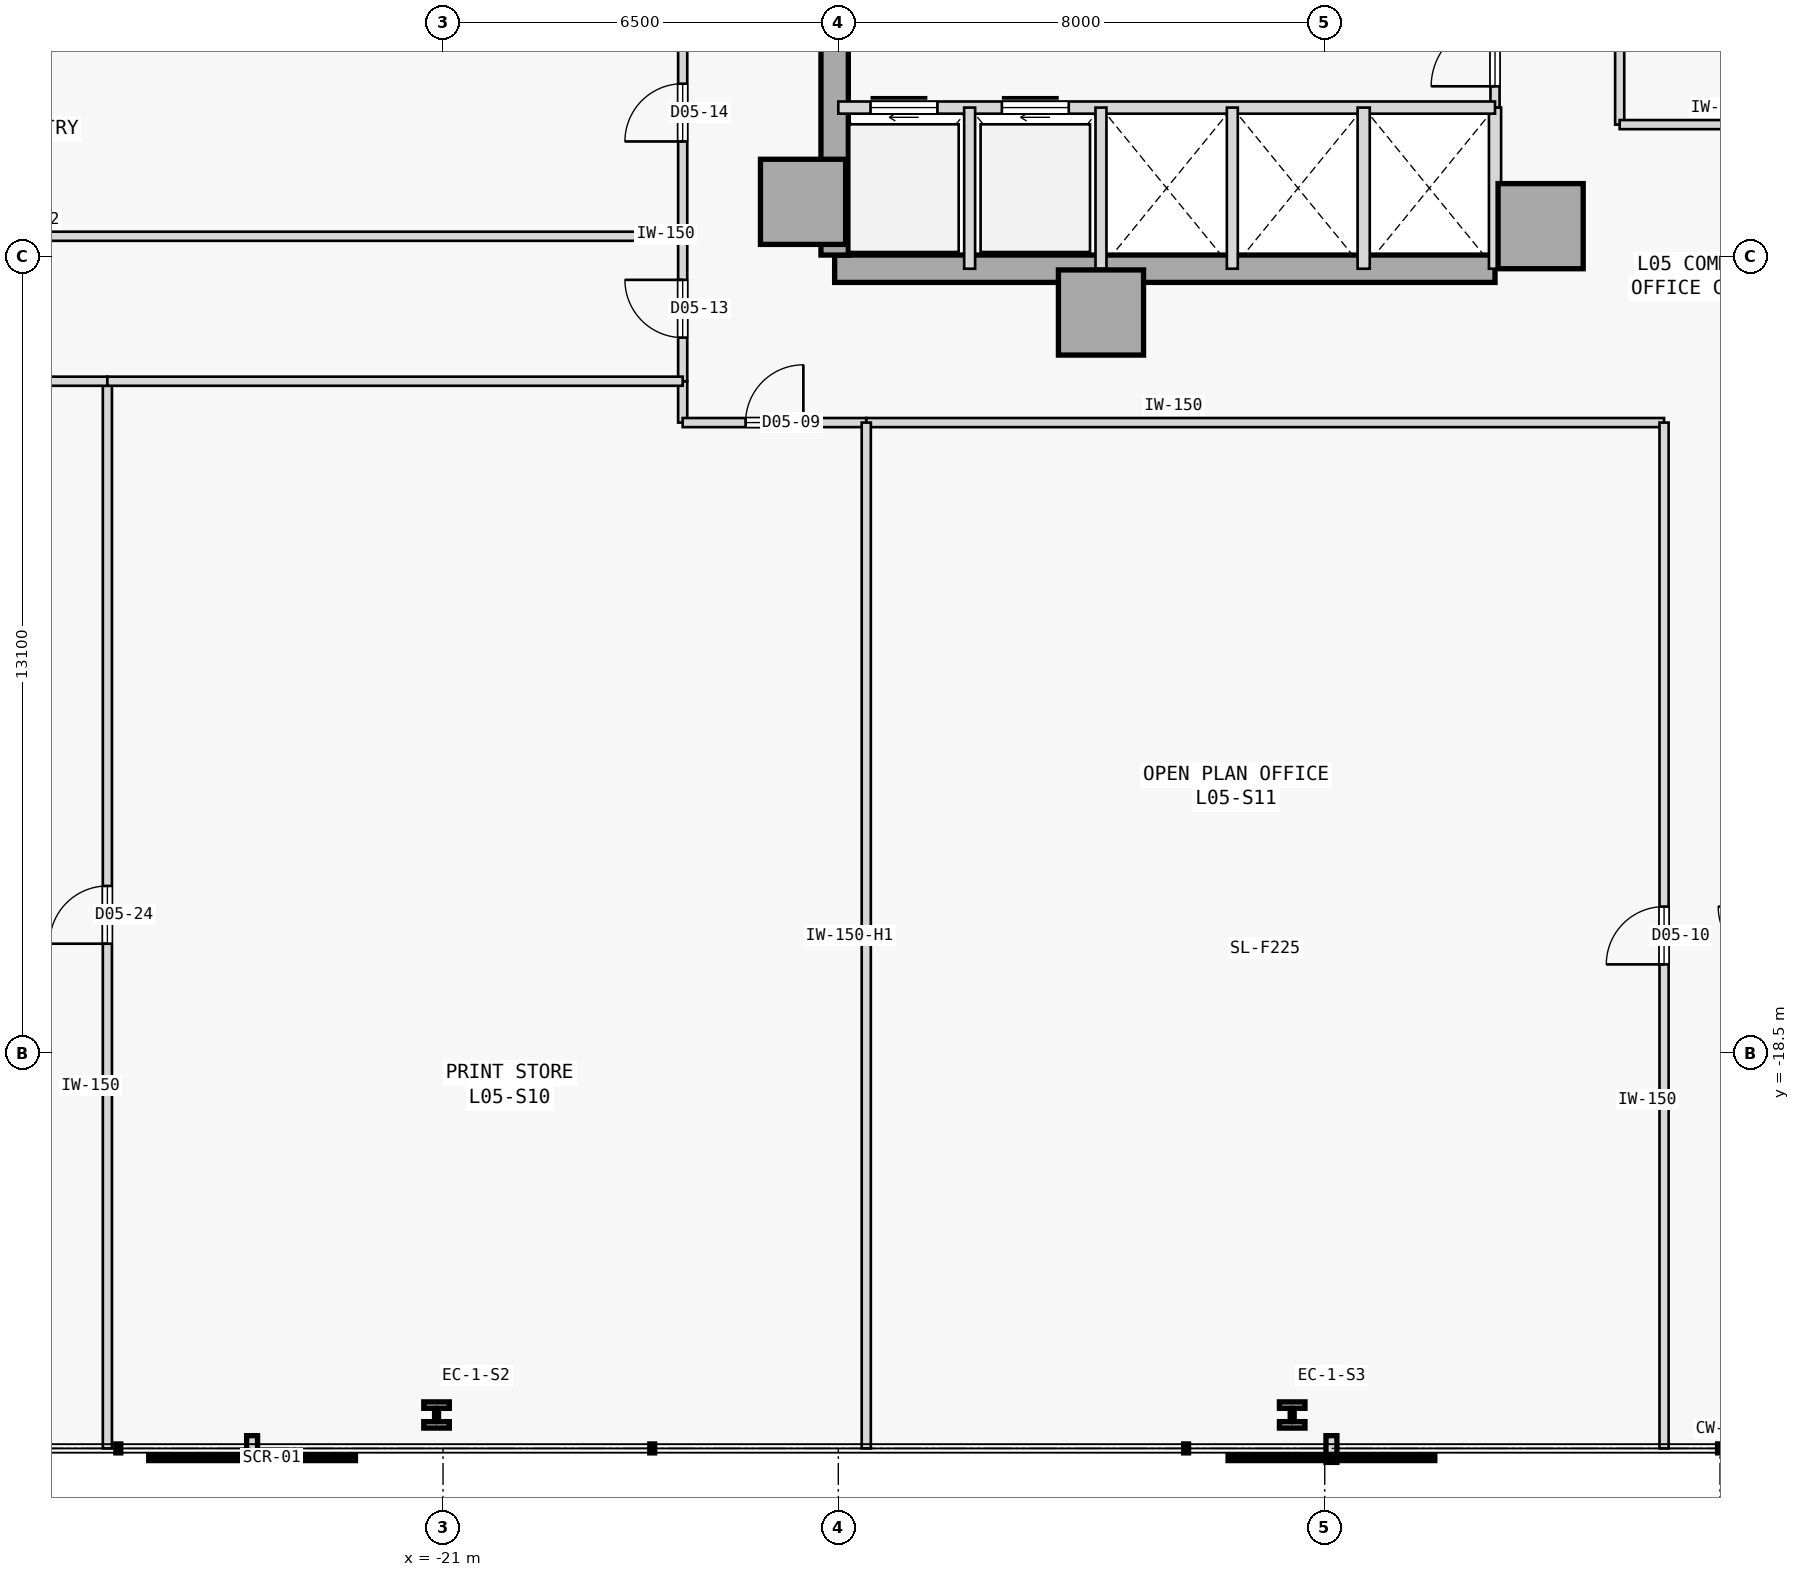
"""IFC4 building model, lengths in metres.
Left out: names, types, materials, properties, quantities, classifications, styles, units other than length and angle.
Written with IfcOpenShell. Run it as: python <this file> out.ifc"""

import sys

from ifc_helpers import new_model, si_unit, direction, frame, frame_2d, origin, origin_2d, place, context, subcontext, project, spatial, rectangle, i_section, extrude, element, fill, save


model = new_model("IFC4")
c1 = context("Model", 3, precision=1e-05, world=origin(), true_north=direction((0.0, 1.0)))
c2 = subcontext(c1, "Body", "Model", "MODEL_VIEW")
j1 = project(units=[si_unit("LENGTHUNIT", "METRE"), si_unit("PLANEANGLEUNIT", "RADIAN")], contexts=[c1])
p1 = place(None, origin())
s1 = spatial("IfcSite", under=j1, at=p1, CompositionType="ELEMENT")
p2 = place(p1, origin())
s2 = spatial("IfcBuilding", under=s1, at=p2, CompositionType="ELEMENT")
p3 = place(p2, frame((0.0, 0.0, 25.6)))
s3 = spatial("IfcBuildingStorey", under=s2, at=p3, CompositionType="ELEMENT", Elevation=25.6)
for number, where, z_axis, x_axis in (
    (1, (-15.08, -4.5, 0.0), (0.0, 0.0, 1.0), (1.0, 0.0, 0.0)),
    (2, (-10.18, -6.32, 0.0), (0.0, 0.0, 1.0), (1.0, 0.0, 0.0)),
    (3, (-2.95, -4.9, 0.0), (0.0, 0.0, 1.0), (1.0, 0.0, 0.0)),
):
    element("IfcColumn", number, at=place(p3, frame(where, z_axis=z_axis, x_axis=x_axis)), inside=s3, PredefinedType="COLUMN", context=c2, shape_type="SweptSolid", body=[
        extrude(rectangle(XDim=1.4, YDim=1.4, at=origin_2d()), origin(), (0.0, 0.0, 1.0), 3.8),
    ])
p4 = place(p3, frame((-14.56, -5.6, 0.0), z_axis=(0.0, 0.0, 1.0), x_axis=(1.0, 0.0, 0.0)))
e4 = element("IfcWall", 4, at=p4, inside=s3, PredefinedType="SHEAR", context=c2, shape_type="SweptSolid", body=[
    extrude(rectangle(XDim=10.86, YDim=0.45, at=frame_2d((5.43, 0.0))), origin(), (0.0, 0.0, 1.0), 3.575),
])
p5 = place(p3, frame((-14.56, -5.375, 0.0), z_axis=(0.0, 0.0, 1.0), x_axis=(0.0, 1.0, 0.0)))
e5 = element("IfcWall", 5, at=p5, inside=s3, PredefinedType="SHEAR", context=c2, shape_type="SweptSolid", body=[
    extrude(rectangle(XDim=10.75, YDim=0.45, at=frame_2d((5.375, 0.0))), origin(), (0.0, 0.0, 1.0), 3.575),
])
for number, where, z_axis, x_axis in (
    (6, (-21.107, -24.45, 0.0), (0.0, 0.0, 1.0), (1.0, 0.0, 0.0)),
    (7, (-7.036, -24.45, 0.0), (0.0, 0.0, 1.0), (1.0, 0.0, 0.0)),
):
    element("IfcColumn", number, at=place(p3, frame(where, z_axis=z_axis, x_axis=x_axis)), inside=s3, PredefinedType="COLUMN", context=c2, shape_type="SweptSolid", body=[
        extrude(i_section(OverallWidth=0.42, OverallDepth=0.431, WebThickness=0.065, FlangeThickness=0.106, FilletRadius=0.015, at=origin_2d()), origin(), (0.0, 0.0, 1.0), 3.8),
    ])
p6 = place(p3, frame((-3.7, -2.95, 0.0), z_axis=(0.0, 0.0, 1.0), x_axis=(0.0, 1.0, 0.0)))
e8 = element("IfcWall", 8, at=p6, inside=s3, PredefinedType="PARTITIONING", context=c2, shape_type="SweptSolid", body=[
    extrude(rectangle(XDim=1.8, YDim=0.15, at=frame_2d((0.9, 0.0))), origin(), (0.0, 0.0, 1.0), 3.575),
])
p7 = place(p6, frame((0.35, 0.0, 0.0)))
e9 = element("IfcOpeningElement", 9, at=p7, cuts=e8, PredefinedType="OPENING", context=c2, shape_type="SweptSolid", body=[
    extrude(rectangle(XDim=1.05, YDim=2.18, at=frame_2d((0.525, 1.09))), frame((0.0, 0.085, 0.0), z_axis=(0.0, -1.0, 0.0), x_axis=(1.0, 0.0, 0.0)), (0.0, 0.0, 1.0), 0.17),
])
p8 = place(p3, frame((-3.7, -5.6, 0.0), z_axis=(0.0, 0.0, 1.0), x_axis=(0.0, 1.0, 0.0)))
e10 = element("IfcWall", 10, at=p8, inside=s3, PredefinedType="STANDARD", context=c2, shape_type="SweptSolid", body=[
    extrude(rectangle(XDim=2.65, YDim=0.2, at=frame_2d((1.325, 0.0))), origin(), (0.0, 0.0, 1.0), 3.575),
])
p9 = place(p3, frame((-14.5, -2.95, 0.0), z_axis=(0.0, 0.0, 1.0), x_axis=(1.0, 0.0, 0.0)))
e11 = element("IfcWall", 11, at=p9, inside=s3, PredefinedType="STANDARD", context=c2, shape_type="SweptSolid", body=[
    extrude(rectangle(XDim=10.8, YDim=0.2, at=frame_2d((5.4, 0.0))), origin(), (0.0, 0.0, 1.0), 3.575),
])
p10 = place(p9, frame((0.53, 0.0, 0.0)))
e12 = element("IfcOpeningElement", 12, at=p10, cuts=e11, PredefinedType="OPENING", context=c2, shape_type="SweptSolid", body=[
    extrude(rectangle(XDim=1.1, YDim=2.15, at=frame_2d((0.55, 1.075))), frame((0.0, 0.11, 0.0), z_axis=(0.0, -1.0, 0.0), x_axis=(1.0, 0.0, 0.0)), (0.0, 0.0, 1.0), 0.22),
])
p11 = place(p9, frame((2.69, 0.0, 0.0)))
e13 = element("IfcOpeningElement", 13, at=p11, cuts=e11, PredefinedType="OPENING", context=c2, shape_type="SweptSolid", body=[
    extrude(rectangle(XDim=1.1, YDim=2.15, at=frame_2d((0.55, 1.075))), frame((0.0, 0.11, 0.0), z_axis=(0.0, -1.0, 0.0), x_axis=(1.0, 0.0, 0.0)), (0.0, 0.0, 1.0), 0.22),
])
p12 = place(p3, frame((-5.86, -5.6, 0.0), z_axis=(0.0, 0.0, 1.0), x_axis=(0.0, 1.0, 0.0)))
e14 = element("IfcWall", 14, at=p12, inside=s3, PredefinedType="STANDARD", context=c2, shape_type="SweptSolid", body=[
    extrude(rectangle(XDim=2.65, YDim=0.2, at=frame_2d((1.325, 0.0))), origin(), (0.0, 0.0, 1.0), 3.575),
])
for number, where, z_axis, x_axis in (
    (15, (-12.34, -5.6, 0.0), (0.0, 0.0, 1.0), (0.0, 1.0, 0.0)),
    (16, (-10.18, -5.6, 0.0), (0.0, 0.0, 1.0), (0.0, 1.0, 0.0)),
    (17, (-8.02, -5.6, 0.0), (0.0, 0.0, 1.0), (0.0, 1.0, 0.0)),
):
    element("IfcWall", number, at=place(p3, frame(where, z_axis=z_axis, x_axis=x_axis)), inside=s3, PredefinedType="STANDARD", context=c2, shape_type="SweptSolid", body=[
        extrude(rectangle(XDim=2.65, YDim=0.18, at=frame_2d((1.325, 0.0))), origin(), (0.0, 0.0, 1.0), 3.575),
    ])
p13 = place(p3, frame((-1.65, -3.23, 0.0), z_axis=(0.0, 0.0, 1.0), x_axis=(0.0, 1.0, 0.0)))
e18 = element("IfcWall", 18, at=p13, inside=s3, PredefinedType="PARTITIONING", context=c2, shape_type="SweptSolid", body=[
    extrude(rectangle(XDim=6.46, YDim=0.15, at=frame_2d((3.23, 0.0))), origin(), (0.0, 0.0, 1.0), 3.575),
])
p14 = place(p13, frame((2.755, 0.0, 0.0)))
e19 = element("IfcOpeningElement", 19, at=p14, cuts=e18, PredefinedType="OPENING", context=c2, shape_type="SweptSolid", body=[
    extrude(rectangle(XDim=0.95, YDim=2.15, at=frame_2d((0.475, 1.075))), frame((0.0, 0.085, 0.0), z_axis=(0.0, -1.0, 0.0), x_axis=(1.0, 0.0, 0.0)), (0.0, 0.0, 1.0), 0.17),
])
p15 = place(p3, frame((-1.65, -3.23, 0.0), z_axis=(0.0, 0.0, 1.0), x_axis=(1.0, 0.0, 0.0)))
e20 = element("IfcWall", 20, at=p15, inside=s3, PredefinedType="PARTITIONING", context=c2, shape_type="SweptSolid", body=[
    extrude(rectangle(XDim=3.3, YDim=0.15, at=frame_2d((1.65, 0.0))), origin(), (0.0, 0.0, 1.0), 3.575),
])
p16 = place(p3, frame((-17.059, -8.13, 0.0), z_axis=(0.0, 0.0, 1.0), x_axis=(0.0, 1.0, 0.0)))
e21 = element("IfcWall", 21, at=p16, inside=s3, PredefinedType="PARTITIONING", context=c2, shape_type="SweptSolid", body=[
    extrude(rectangle(XDim=0.68, YDim=0.15, at=frame_2d((0.34, 0.0))), origin(), (0.0, 0.0, 1.0), 3.575),
])
p17 = place(p3, frame((-17.059, -8.13, 0.0), z_axis=(0.0, 0.0, 1.0), x_axis=(1.0, 0.0, 0.0)))
e22 = element("IfcWall", 22, at=p17, inside=s3, PredefinedType="PARTITIONING", context=c2, shape_type="SweptSolid", body=[
    extrude(rectangle(XDim=3.019, YDim=0.15, at=frame_2d((1.51, 0.0))), origin(), (0.0, 0.0, 1.0), 3.575),
])
p18 = place(p17, frame((1.034, 0.0, 0.0)))
e23 = element("IfcOpeningElement", 23, at=p18, cuts=e22, PredefinedType="OPENING", context=c2, shape_type="SweptSolid", body=[
    extrude(rectangle(XDim=0.95, YDim=2.15, at=frame_2d((0.475, 1.075))), frame((0.0, 0.085, 0.0), z_axis=(0.0, -1.0, 0.0), x_axis=(1.0, 0.0, 0.0)), (0.0, 0.0, 1.0), 0.17),
])
p19 = place(p3, frame((-14.04, -8.13, 0.0), z_axis=(0.0, 0.0, 1.0), x_axis=(1.0, 0.0, 0.0)))
e24 = element("IfcWall", 24, at=p19, inside=s3, PredefinedType="PARTITIONING", context=c2, shape_type="SweptSolid", body=[
    extrude(rectangle(XDim=13.12, YDim=0.15, at=frame_2d((6.56, 0.0))), origin(), (0.0, 0.0, 1.0), 3.575),
])
p20 = place(p3, frame((-0.92, -25.0, 0.0), z_axis=(0.0, 0.0, 1.0), x_axis=(0.0, 1.0, 0.0)))
e25 = element("IfcWall", 25, at=p20, inside=s3, PredefinedType="PARTITIONING", context=c2, shape_type="SweptSolid", body=[
    extrude(rectangle(XDim=16.87, YDim=0.15, at=frame_2d((8.435, 0.0))), origin(), (0.0, 0.0, 1.0), 3.575),
])
p21 = place(p20, frame((7.96, 0.0, 0.0)))
e26 = element("IfcOpeningElement", 26, at=p21, cuts=e25, PredefinedType="OPENING", context=c2, shape_type="SweptSolid", body=[
    extrude(rectangle(XDim=0.95, YDim=2.15, at=frame_2d((0.475, 1.075))), frame((0.0, 0.085, 0.0), z_axis=(0.0, -1.0, 0.0), x_axis=(1.0, 0.0, 0.0)), (0.0, 0.0, 1.0), 0.17),
])
p22 = place(p3, frame((-17.059, -7.45, 0.0), z_axis=(0.0, 0.0, 1.0), x_axis=(0.0, 1.0, 0.0)))
e27 = element("IfcWall", 27, at=p22, inside=s3, PredefinedType="PARTITIONING", context=c2, shape_type="SweptSolid", body=[
    extrude(rectangle(XDim=2.384, YDim=0.15, at=frame_2d((1.192, 0.0))), origin(), (0.0, 0.0, 1.0), 3.575),
])
p23 = place(p22, frame((0.717, 0.0, 0.0)))
e28 = element("IfcOpeningElement", 28, at=p23, cuts=e27, PredefinedType="OPENING", context=c2, shape_type="SweptSolid", body=[
    extrude(rectangle(XDim=0.95, YDim=2.15, at=frame_2d((0.475, 1.075))), frame((0.0, 0.085, 0.0), z_axis=(0.0, -1.0, 0.0), x_axis=(1.0, 0.0, 0.0)), (0.0, 0.0, 1.0), 0.17),
])
p24 = place(p3, frame((-17.059, -5.066, 0.0), z_axis=(0.0, 0.0, 1.0), x_axis=(0.0, 1.0, 0.0)))
e29 = element("IfcWall", 29, at=p24, inside=s3, PredefinedType="PARTITIONING", context=c2, shape_type="SweptSolid", body=[
    extrude(rectangle(XDim=3.129, YDim=0.15, at=frame_2d((1.564, 0.0))), origin(), (0.0, 0.0, 1.0), 3.575),
])
p25 = place(p24, frame((1.559, 0.0, 0.0)))
e30 = element("IfcOpeningElement", 30, at=p25, cuts=e29, PredefinedType="OPENING", context=c2, shape_type="SweptSolid", body=[
    extrude(rectangle(XDim=0.95, YDim=2.15, at=frame_2d((0.475, 1.075))), frame((0.0, 0.085, 0.0), z_axis=(0.0, -1.0, 0.0), x_axis=(1.0, 0.0, 0.0)), (0.0, 0.0, 1.0), 0.17),
])
p26 = place(p3, frame((-26.52, -25.0, 0.0), z_axis=(0.0, 0.0, 1.0), x_axis=(0.0, 1.0, 0.0)))
e31 = element("IfcWall", 31, at=p26, inside=s3, PredefinedType="PARTITIONING", context=c2, shape_type="SweptSolid", body=[
    extrude(rectangle(XDim=17.55, YDim=0.15, at=frame_2d((8.775, 0.0))), origin(), (0.0, 0.0, 1.0), 3.575),
])
p27 = place(p26, frame((8.3, 0.0, 0.0)))
e32 = element("IfcOpeningElement", 32, at=p27, cuts=e31, PredefinedType="OPENING", context=c2, shape_type="SweptSolid", body=[
    extrude(rectangle(XDim=0.95, YDim=2.15, at=frame_2d((0.475, 1.075))), frame((0.0, 0.085, 0.0), z_axis=(0.0, -1.0, 0.0), x_axis=(1.0, 0.0, 0.0)), (0.0, 0.0, 1.0), 0.17),
])
p28 = place(p3, frame((-39.0, -7.45, 0.0), z_axis=(0.0, 0.0, 1.0), x_axis=(1.0, 0.0, 0.0)))
e33 = element("IfcWall", 33, at=p28, inside=s3, PredefinedType="PARTITIONING", context=c2, shape_type="SweptSolid", body=[
    extrude(rectangle(XDim=12.48, YDim=0.15, at=frame_2d((6.24, 0.0))), origin(), (0.0, 0.0, 1.0), 3.575),
])
p29 = place(p3, frame((-14.04, -25.0, 0.0), z_axis=(0.0, 0.0, 1.0), x_axis=(0.0, 1.0, 0.0)))
e34 = element("IfcWall", 34, at=p29, inside=s3, PredefinedType="PARTITIONING", context=c2, shape_type="SweptSolid", body=[
    extrude(rectangle(XDim=16.87, YDim=0.15, at=frame_2d((8.435, 0.0))), origin(), (0.0, 0.0, 1.0), 3.125),
])
p30 = place(p3, frame((-26.52, -7.45, 0.0), z_axis=(0.0, 0.0, 1.0), x_axis=(1.0, 0.0, 0.0)))
e35 = element("IfcWall", 35, at=p30, inside=s3, PredefinedType="PARTITIONING", context=c2, shape_type="SweptSolid", body=[
    extrude(rectangle(XDim=9.461, YDim=0.15, at=frame_2d((4.73, 0.0))), origin(), (0.0, 0.0, 1.0), 3.575),
])
p31 = place(p3, frame((-39.0, -5.066, 0.0), z_axis=(0.0, 0.0, 1.0), x_axis=(1.0, 0.0, 0.0)))
e36 = element("IfcWall", 36, at=p31, inside=s3, PredefinedType="PARTITIONING", context=c2, shape_type="SweptSolid", body=[
    extrude(rectangle(XDim=21.941, YDim=0.15, at=frame_2d((10.97, 0.0))), origin(), (0.0, 0.0, 1.0), 2.975),
])
p32 = place(p7, origin())
e37 = element("IfcDoor", 37, at=p32, inside=s3, OperationType="SINGLE_SWING_LEFT", PredefinedType="DOOR", context=c2, shape_type="SweptSolid", body=[
    extrude(rectangle(XDim=1.05, YDim=2.18, at=frame_2d((0.525, 1.09))), frame((0.0, 0.025, 0.0), z_axis=(0.0, -1.0, 0.0), x_axis=(1.0, 0.0, 0.0)), (0.0, 0.0, 1.0), 0.05),
])
fill(e9, e37)
p33 = place(p10, origin())
e38 = element("IfcDoor", 38, at=p33, inside=s3, OperationType="SLIDING_TO_RIGHT", PredefinedType="DOOR", context=c2, shape_type="SweptSolid", body=[
    extrude(rectangle(XDim=1.1, YDim=2.15, at=frame_2d((0.55, 1.075))), frame((0.0, 0.025, 0.0), z_axis=(0.0, -1.0, 0.0), x_axis=(1.0, 0.0, 0.0)), (0.0, 0.0, 1.0), 0.05),
])
fill(e12, e38)
p34 = place(p11, origin())
e39 = element("IfcDoor", 39, at=p34, inside=s3, OperationType="SLIDING_TO_RIGHT", PredefinedType="DOOR", context=c2, shape_type="SweptSolid", body=[
    extrude(rectangle(XDim=1.1, YDim=2.15, at=frame_2d((0.55, 1.075))), frame((0.0, 0.025, 0.0), z_axis=(0.0, -1.0, 0.0), x_axis=(1.0, 0.0, 0.0)), (0.0, 0.0, 1.0), 0.05),
])
fill(e13, e39)
p35 = place(p18, origin())
e40 = element("IfcDoor", 40, at=p35, inside=s3, OperationType="SINGLE_SWING_RIGHT", PredefinedType="DOOR", context=c2, shape_type="SweptSolid", body=[
    extrude(rectangle(XDim=0.95, YDim=2.15, at=frame_2d((0.475, 1.075))), frame((0.0, 0.025, 0.0), z_axis=(0.0, -1.0, 0.0), x_axis=(1.0, 0.0, 0.0)), (0.0, 0.0, 1.0), 0.05),
])
fill(e23, e40)
p36 = place(p21, origin())
e41 = element("IfcDoor", 41, at=p36, inside=s3, OperationType="SINGLE_SWING_LEFT", PredefinedType="DOOR", context=c2, shape_type="SweptSolid", body=[
    extrude(rectangle(XDim=0.95, YDim=2.15, at=frame_2d((0.475, 1.075))), frame((0.0, 0.025, 0.0), z_axis=(0.0, -1.0, 0.0), x_axis=(1.0, 0.0, 0.0)), (0.0, 0.0, 1.0), 0.05),
])
fill(e26, e41)
p37 = place(p23, origin())
e42 = element("IfcDoor", 42, at=p37, inside=s3, OperationType="SINGLE_SWING_RIGHT", PredefinedType="DOOR", context=c2, shape_type="SweptSolid", body=[
    extrude(rectangle(XDim=0.95, YDim=2.15, at=frame_2d((0.475, 1.075))), frame((0.0, 0.025, 0.0), z_axis=(0.0, -1.0, 0.0), x_axis=(1.0, 0.0, 0.0)), (0.0, 0.0, 1.0), 0.05),
])
fill(e28, e42)
p38 = place(p25, origin())
e43 = element("IfcDoor", 43, at=p38, inside=s3, OperationType="SINGLE_SWING_LEFT", PredefinedType="DOOR", context=c2, shape_type="SweptSolid", body=[
    extrude(rectangle(XDim=0.95, YDim=2.15, at=frame_2d((0.475, 1.075))), frame((0.0, 0.025, 0.0), z_axis=(0.0, -1.0, 0.0), x_axis=(1.0, 0.0, 0.0)), (0.0, 0.0, 1.0), 0.05),
])
fill(e30, e43)
p39 = place(p27, origin())
e44 = element("IfcDoor", 44, at=p39, inside=s3, OperationType="SINGLE_SWING_LEFT", PredefinedType="DOOR", context=c2, shape_type="SweptSolid", body=[
    extrude(rectangle(XDim=0.95, YDim=2.15, at=frame_2d((0.475, 1.075))), frame((0.0, 0.025, 0.0), z_axis=(0.0, -1.0, 0.0), x_axis=(1.0, 0.0, 0.0)), (0.0, 0.0, 1.0), 0.05),
])
fill(e32, e44)
save(model, sys.argv[1])
